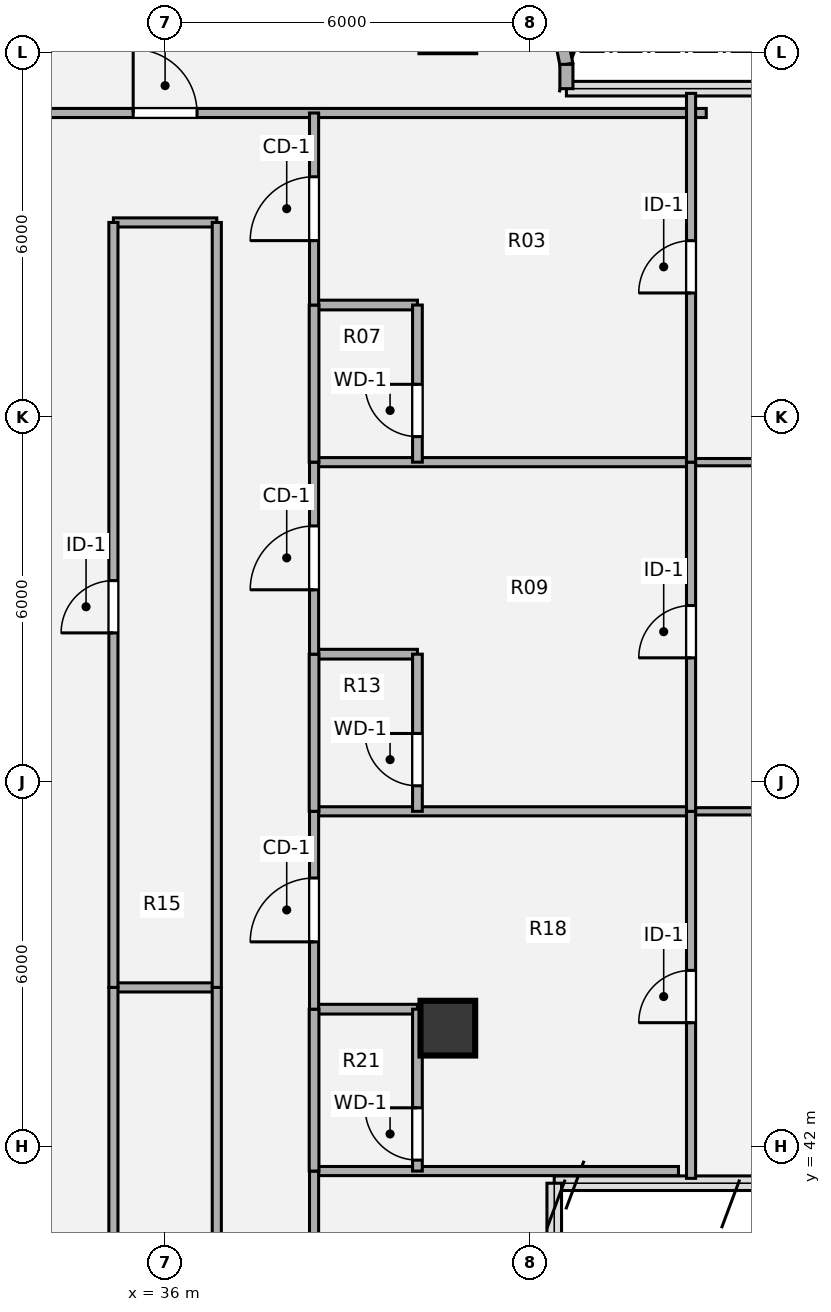
"""IFC4 building model, lengths in metres.
Left out: names, types, materials, properties, quantities, classifications, styles, units other than length and angle.
Written with IfcOpenShell. Run it as: python <this file> out.ifc"""

import sys

from ifc_helpers import new_model, si_unit, direction, frame, frame_2d, origin, origin_2d, place, context, subcontext, project, spatial, rectangle, hollow_circle, extrude, source, transform, mapped, element, fill, save


model = new_model("IFC4")
c1 = context("Model", 3, precision=1e-05, world=origin(), true_north=direction((0.0, 1.0)))
c2 = subcontext(c1, "Body", "Model", "MODEL_VIEW")
j1 = project(units=[si_unit("LENGTHUNIT", "METRE"), si_unit("PLANEANGLEUNIT", "RADIAN")], contexts=[c1])
p1 = place(None, origin())
s1 = spatial("IfcSite", under=j1, at=p1, CompositionType="ELEMENT")
p2 = place(p1, origin())
s2 = spatial("IfcBuilding", under=s1, at=p2, CompositionType="ELEMENT")
p3 = place(p2, frame((0.0, 0.0, 234.36)))
s3 = spatial("IfcBuildingStorey", under=s2, at=p3, CompositionType="ELEMENT", Elevation=234.36)
m1 = source(origin(), c2, "Body", "SweptSolid", [
    extrude(hollow_circle(Radius=0.45, WallThickness=0.032, at=origin_2d()), origin(), (0.0, 0.0, 1.0), 3.78),
])
p4 = place(p3, frame((40.65, 43.95, 0.0), z_axis=(0.0, 0.0, 1.0), x_axis=(1.0, 0.0, 0.0)))
e1 = element("IfcColumn", 1, at=p4, inside=s3, PredefinedType="COLUMN", context=c2, shape_type="MappedRepresentation", body=[
    mapped(m1, transform((0.0, 0.0, 0.0), x_axis=(1.0, 0.0, 0.0), y_axis=(0.0, 1.0, 0.0), z_axis=(0.0, 0.0, 1.0), scale=1.0)),
])
p5 = place(p3, frame((42.402, 60.795, 0.0), z_axis=(0.0, 0.0, 1.0), x_axis=(0.195190360752, -0.980765376158, 0.0)))
e2 = element("IfcWall", 2, at=p5, inside=s3, PredefinedType="SOLIDWALL", context=c2, shape_type="SweptSolid", body=[
    extrude(rectangle(XDim=1.014, YDim=0.215, at=frame_2d((0.507, 0.0))), origin(), (0.0, 0.0, 1.0), 3.53),
])
p6 = place(p3, frame((42.6, 59.8, 0.0), z_axis=(0.0, 0.0, 1.0), x_axis=(0.0, -1.0, 0.0)))
e3 = element("IfcWall", 3, at=p6, inside=s3, PredefinedType="SOLIDWALL", context=c2, shape_type="SweptSolid", body=[
    extrude(rectangle(XDim=0.4, YDim=0.215, at=frame_2d((0.2, 0.0))), origin(), (0.0, 0.0, 1.0), 3.53),
])
p7 = place(p3, frame((38.45, 41.6, 0.0), z_axis=(0.0, 0.0, 1.0), x_axis=(1.0, 0.0, 0.0)))
e4 = element("IfcWall", 4, at=p7, inside=s3, PredefinedType="PARTITIONING", context=c2, shape_type="SweptSolid", body=[
    extrude(rectangle(XDim=5.993, YDim=0.15, at=frame_2d((2.997, 0.0))), origin(), (0.0, 0.0, 1.0), 3.5),
])
p8 = place(p3, frame((38.45, 44.262, 0.0), z_axis=(0.0, 0.0, 1.0), x_axis=(1.0, 0.0, 0.0)))
e5 = element("IfcWall", 5, at=p8, inside=s3, PredefinedType="PLUMBINGWALL", context=c2, shape_type="SweptSolid", body=[
    extrude(rectangle(XDim=1.7, YDim=0.16, at=frame_2d((0.85, 0.0))), origin(), (0.0, 0.0, 1.0), 2.903),
])
p9 = place(p3, frame((35.15, 44.62, 0.0), z_axis=(0.0, 0.0, 1.0), x_axis=(1.0, 0.0, 0.0)))
e6 = element("IfcWall", 6, at=p9, inside=s3, PredefinedType="PARTITIONING", context=c2, shape_type="SweptSolid", body=[
    extrude(rectangle(XDim=1.7, YDim=0.15, at=frame_2d((0.85, 0.0))), origin(), (0.0, 0.0, 1.0), 3.259),
])
p10 = place(p3, frame((38.45, 47.516, 0.0), z_axis=(0.0, 0.0, 1.0), x_axis=(1.0, 0.0, 0.0)))
e7 = element("IfcWall", 7, at=p10, inside=s3, PredefinedType="PARTITIONING", context=c2, shape_type="SweptSolid", body=[
    extrude(rectangle(XDim=6.2, YDim=0.15, at=frame_2d((3.1, 0.0))), origin(), (0.0, 0.0, 1.0), 2.982),
])
p11 = place(p3, frame((44.65, 47.516, 0.0), z_axis=(0.0, 0.0, 1.0), x_axis=(1.0, 0.0, 0.0)))
e8 = element("IfcWall", 8, at=p11, inside=s3, PredefinedType="PARTITIONING", context=c2, shape_type="SweptSolid", body=[
    extrude(rectangle(XDim=9.57, YDim=0.12, at=frame_2d((4.785, 0.0))), origin(), (0.0, 0.0, 1.0), 2.982),
])
p12 = place(p3, frame((38.45, 50.1, 0.0), z_axis=(0.0, 0.0, 1.0), x_axis=(1.0, 0.0, 0.0)))
e9 = element("IfcWall", 9, at=p12, inside=s3, PredefinedType="PLUMBINGWALL", context=c2, shape_type="SweptSolid", body=[
    extrude(rectangle(XDim=1.7, YDim=0.16, at=frame_2d((0.85, 0.0))), origin(), (0.0, 0.0, 1.0), 3.259),
])
p13 = place(p3, frame((38.45, 53.258, 0.0), z_axis=(0.0, 0.0, 1.0), x_axis=(1.0, 0.0, 0.0)))
e10 = element("IfcWall", 10, at=p13, inside=s3, PredefinedType="PARTITIONING", context=c2, shape_type="SweptSolid", body=[
    extrude(rectangle(XDim=6.2, YDim=0.15, at=frame_2d((3.1, 0.0))), origin(), (0.0, 0.0, 1.0), 3.055),
])
p14 = place(p3, frame((44.65, 53.258, 0.0), z_axis=(0.0, 0.0, 1.0), x_axis=(1.0, 0.0, 0.0)))
e11 = element("IfcWall", 11, at=p14, inside=s3, PredefinedType="PARTITIONING", context=c2, shape_type="SweptSolid", body=[
    extrude(rectangle(XDim=9.57, YDim=0.12, at=frame_2d((4.785, 0.0))), origin(), (0.0, 0.0, 1.0), 3.055),
])
p15 = place(p3, frame((38.45, 55.842, 0.0), z_axis=(0.0, 0.0, 1.0), x_axis=(1.0, 0.0, 0.0)))
e12 = element("IfcWall", 12, at=p15, inside=s3, PredefinedType="PLUMBINGWALL", context=c2, shape_type="SweptSolid", body=[
    extrude(rectangle(XDim=1.7, YDim=0.16, at=frame_2d((0.85, 0.0))), origin(), (0.0, 0.0, 1.0), 3.259),
])
p16 = place(p3, frame((35.15, 57.2, 0.0), z_axis=(0.0, 0.0, 1.0), x_axis=(1.0, 0.0, 0.0)))
e13 = element("IfcWall", 13, at=p16, inside=s3, PredefinedType="PARTITIONING", context=c2, shape_type="SweptSolid", body=[
    extrude(rectangle(XDim=1.7, YDim=0.15, at=frame_2d((0.85, 0.0))), origin(), (0.0, 0.0, 1.0), 3.308),
])
p17 = place(p3, frame((27.1, 59.0, 0.0), z_axis=(0.0, 0.0, 1.0), x_axis=(1.0, 0.0, 0.0)))
e14 = element("IfcWall", 14, at=p17, inside=s3, PredefinedType="PARTITIONING", context=c2, shape_type="SweptSolid", body=[
    extrude(rectangle(XDim=17.8, YDim=0.15, at=frame_2d((8.9, 0.0))), origin(), (0.0, 0.0, 1.0), 3.308),
])
p18 = place(p17, frame((8.375, 0.0, 0.0)))
e15 = element("IfcOpeningElement", 15, at=p18, cuts=e14, PredefinedType="OPENING", context=c2, shape_type="SweptSolid", body=[
    extrude(rectangle(XDim=1.05, YDim=2.1, at=origin_2d()), frame((0.525, 0.085, 1.05), z_axis=(0.0, -1.0, 0.0), x_axis=(1.0, 0.0, 0.0)), (0.0, 0.0, 1.0), 0.17),
])
p19 = place(p3, frame((35.15, 25.2, 0.0), z_axis=(0.0, 0.0, 1.0), x_axis=(0.0, 1.0, 0.0)))
e16 = element("IfcWall", 16, at=p19, inside=s3, PredefinedType="PARTITIONING", context=c2, shape_type="SweptSolid", body=[
    extrude(rectangle(XDim=19.42, YDim=0.15, at=frame_2d((9.71, 0.0))), origin(), (0.0, 0.0, 1.0), 3.5),
])
p20 = place(p3, frame((35.15, 44.62, 0.0), z_axis=(0.0, 0.0, 1.0), x_axis=(0.0, 1.0, 0.0)))
e17 = element("IfcWall", 17, at=p20, inside=s3, PredefinedType="PARTITIONING", context=c2, shape_type="SweptSolid", body=[
    extrude(rectangle(XDim=12.58, YDim=0.15, at=frame_2d((6.29, 0.0))), origin(), (0.0, 0.0, 1.0), 3.5),
])
p21 = place(p20, frame((5.83, 0.0, 0.0)))
e18 = element("IfcOpeningElement", 18, at=p21, cuts=e17, PredefinedType="OPENING", context=c2, shape_type="SweptSolid", body=[
    extrude(rectangle(XDim=0.86, YDim=2.1, at=origin_2d()), frame((0.43, 0.085, 1.05), z_axis=(0.0, -1.0, 0.0), x_axis=(1.0, 0.0, 0.0)), (0.0, 0.0, 1.0), 0.17),
])
p22 = place(p3, frame((36.85, 25.2, 0.0), z_axis=(0.0, 0.0, 1.0), x_axis=(0.0, 1.0, 0.0)))
e19 = element("IfcWall", 19, at=p22, inside=s3, PredefinedType="PARTITIONING", context=c2, shape_type="SweptSolid", body=[
    extrude(rectangle(XDim=19.42, YDim=0.15, at=frame_2d((9.71, 0.0))), origin(), (0.0, 0.0, 1.0), 3.5),
])
p23 = place(p22, frame((9.185, 0.0, 0.0)))
e20 = element("IfcOpeningElement", 20, at=p23, cuts=e19, PredefinedType="OPENING", context=c2, shape_type="SweptSolid", body=[
    extrude(rectangle(XDim=1.05, YDim=2.1, at=origin_2d()), frame((0.525, 0.085, 1.05), z_axis=(0.0, -1.0, 0.0), x_axis=(1.0, 0.0, 0.0)), (0.0, 0.0, 1.0), 0.17),
])
p24 = place(p3, frame((36.85, 44.62, 0.0), z_axis=(0.0, 0.0, 1.0), x_axis=(0.0, 1.0, 0.0)))
e21 = element("IfcWall", 21, at=p24, inside=s3, PredefinedType="PARTITIONING", context=c2, shape_type="SweptSolid", body=[
    extrude(rectangle(XDim=12.58, YDim=0.15, at=frame_2d((6.29, 0.0))), origin(), (0.0, 0.0, 1.0), 3.5),
])
p25 = place(p3, frame((38.45, 21.2, 0.0), z_axis=(0.0, 0.0, 1.0), x_axis=(0.0, 1.0, 0.0)))
e22 = element("IfcWall", 22, at=p25, inside=s3, PredefinedType="PARTITIONING", context=c2, shape_type="SweptSolid", body=[
    extrude(rectangle(XDim=20.4, YDim=0.15, at=frame_2d((10.2, 0.0))), origin(), (0.0, 0.0, 1.0), 3.5),
])
p26 = place(p25, frame((9.575, 0.0, 0.0)))
e23 = element("IfcOpeningElement", 23, at=p26, cuts=e22, PredefinedType="OPENING", context=c2, shape_type="SweptSolid", body=[
    extrude(rectangle(XDim=1.05, YDim=2.1, at=origin_2d()), frame((0.525, 0.085, 1.05), z_axis=(0.0, -1.0, 0.0), x_axis=(1.0, 0.0, 0.0)), (0.0, 0.0, 1.0), 0.17),
])
p27 = place(p3, frame((38.45, 41.6, 0.0), z_axis=(0.0, 0.0, 1.0), x_axis=(0.0, 1.0, 0.0)))
e24 = element("IfcWall", 24, at=p27, inside=s3, PredefinedType="PLUMBINGWALL", context=c2, shape_type="SweptSolid", body=[
    extrude(rectangle(XDim=2.662, YDim=0.16, at=frame_2d((1.331, 0.0))), origin(), (0.0, 0.0, 1.0), 3.5),
])
p28 = place(p3, frame((38.45, 44.262, 0.0), z_axis=(0.0, 0.0, 1.0), x_axis=(0.0, 1.0, 0.0)))
e25 = element("IfcWall", 25, at=p28, inside=s3, PredefinedType="PARTITIONING", context=c2, shape_type="SweptSolid", body=[
    extrude(rectangle(XDim=3.254, YDim=0.15, at=frame_2d((1.627, 0.0))), origin(), (0.0, 0.0, 1.0), 3.5),
])
p29 = place(p28, frame((1.107, 0.0, 0.0)))
e26 = element("IfcOpeningElement", 26, at=p29, cuts=e25, PredefinedType="OPENING", context=c2, shape_type="SweptSolid", body=[
    extrude(rectangle(XDim=1.05, YDim=2.1, at=origin_2d()), frame((0.525, 0.085, 1.05), z_axis=(0.0, -1.0, 0.0), x_axis=(1.0, 0.0, 0.0)), (0.0, 0.0, 1.0), 0.17),
])
p30 = place(p3, frame((38.45, 47.516, 0.0), z_axis=(0.0, 0.0, 1.0), x_axis=(0.0, 1.0, 0.0)))
e27 = element("IfcWall", 27, at=p30, inside=s3, PredefinedType="PLUMBINGWALL", context=c2, shape_type="SweptSolid", body=[
    extrude(rectangle(XDim=2.584, YDim=0.16, at=frame_2d((1.292, 0.0))), origin(), (0.0, 0.0, 1.0), 3.5),
])
p31 = place(p3, frame((38.45, 50.1, 0.0), z_axis=(0.0, 0.0, 1.0), x_axis=(0.0, 1.0, 0.0)))
e28 = element("IfcWall", 28, at=p31, inside=s3, PredefinedType="PARTITIONING", context=c2, shape_type="SweptSolid", body=[
    extrude(rectangle(XDim=3.158, YDim=0.15, at=frame_2d((1.579, 0.0))), origin(), (0.0, 0.0, 1.0), 3.5),
])
p32 = place(p31, frame((1.059, 0.0, 0.0)))
e29 = element("IfcOpeningElement", 29, at=p32, cuts=e28, PredefinedType="OPENING", context=c2, shape_type="SweptSolid", body=[
    extrude(rectangle(XDim=1.05, YDim=2.1, at=origin_2d()), frame((0.525, 0.085, 1.05), z_axis=(0.0, -1.0, 0.0), x_axis=(1.0, 0.0, 0.0)), (0.0, 0.0, 1.0), 0.17),
])
p33 = place(p3, frame((38.45, 53.258, 0.0), z_axis=(0.0, 0.0, 1.0), x_axis=(0.0, 1.0, 0.0)))
e30 = element("IfcWall", 30, at=p33, inside=s3, PredefinedType="PLUMBINGWALL", context=c2, shape_type="SweptSolid", body=[
    extrude(rectangle(XDim=2.584, YDim=0.16, at=frame_2d((1.292, 0.0))), origin(), (0.0, 0.0, 1.0), 3.5),
])
p34 = place(p3, frame((38.45, 55.842, 0.0), z_axis=(0.0, 0.0, 1.0), x_axis=(0.0, 1.0, 0.0)))
e31 = element("IfcWall", 31, at=p34, inside=s3, PredefinedType="PARTITIONING", context=c2, shape_type="SweptSolid", body=[
    extrude(rectangle(XDim=3.158, YDim=0.15, at=frame_2d((1.579, 0.0))), origin(), (0.0, 0.0, 1.0), 3.5),
])
p35 = place(p34, frame((1.059, 0.0, 0.0)))
e32 = element("IfcOpeningElement", 32, at=p35, cuts=e31, PredefinedType="OPENING", context=c2, shape_type="SweptSolid", body=[
    extrude(rectangle(XDim=1.05, YDim=2.1, at=origin_2d()), frame((0.525, 0.085, 1.05), z_axis=(0.0, -1.0, 0.0), x_axis=(1.0, 0.0, 0.0)), (0.0, 0.0, 1.0), 0.17),
])
p36 = place(p3, frame((40.15, 41.6, 0.0), z_axis=(0.0, 0.0, 1.0), x_axis=(0.0, 1.0, 0.0)))
e33 = element("IfcWall", 33, at=p36, inside=s3, PredefinedType="PLUMBINGWALL", context=c2, shape_type="SweptSolid", body=[
    extrude(rectangle(XDim=2.662, YDim=0.16, at=frame_2d((1.331, 0.0))), origin(), (0.0, 0.0, 1.0), 3.5),
])
p37 = place(p36, frame((0.18, 0.0, 0.0)))
e34 = element("IfcOpeningElement", 34, at=p37, cuts=e33, PredefinedType="OPENING", context=c2, shape_type="SweptSolid", body=[
    extrude(rectangle(XDim=0.86, YDim=2.1, at=origin_2d()), frame((0.43, 0.09, 1.05), z_axis=(0.0, -1.0, 0.0), x_axis=(1.0, 0.0, 0.0)), (0.0, 0.0, 1.0), 0.18),
])
p38 = place(p3, frame((40.15, 47.516, 0.0), z_axis=(0.0, 0.0, 1.0), x_axis=(0.0, 1.0, 0.0)))
e35 = element("IfcWall", 35, at=p38, inside=s3, PredefinedType="PLUMBINGWALL", context=c2, shape_type="SweptSolid", body=[
    extrude(rectangle(XDim=2.584, YDim=0.16, at=frame_2d((1.292, 0.0))), origin(), (0.0, 0.0, 1.0), 3.5),
])
p39 = place(p38, frame((0.42, 0.0, 0.0)))
e36 = element("IfcOpeningElement", 36, at=p39, cuts=e35, PredefinedType="OPENING", context=c2, shape_type="SweptSolid", body=[
    extrude(rectangle(XDim=0.86, YDim=2.1, at=origin_2d()), frame((0.43, 0.09, 1.05), z_axis=(0.0, -1.0, 0.0), x_axis=(1.0, 0.0, 0.0)), (0.0, 0.0, 1.0), 0.18),
])
p40 = place(p3, frame((40.15, 53.258, 0.0), z_axis=(0.0, 0.0, 1.0), x_axis=(0.0, 1.0, 0.0)))
e37 = element("IfcWall", 37, at=p40, inside=s3, PredefinedType="PLUMBINGWALL", context=c2, shape_type="SweptSolid", body=[
    extrude(rectangle(XDim=2.584, YDim=0.16, at=frame_2d((1.292, 0.0))), origin(), (0.0, 0.0, 1.0), 3.5),
])
p41 = place(p40, frame((0.42, 0.0, 0.0)))
e38 = element("IfcOpeningElement", 38, at=p41, cuts=e37, PredefinedType="OPENING", context=c2, shape_type="SweptSolid", body=[
    extrude(rectangle(XDim=0.86, YDim=2.1, at=origin_2d()), frame((0.43, 0.09, 1.05), z_axis=(0.0, -1.0, 0.0), x_axis=(1.0, 0.0, 0.0)), (0.0, 0.0, 1.0), 0.18),
])
p42 = place(p3, frame((44.65, 41.48, 0.0), z_axis=(0.0, 0.0, 1.0), x_axis=(0.0, 1.0, 0.0)))
e39 = element("IfcWall", 39, at=p42, inside=s3, PredefinedType="PARTITIONING", context=c2, shape_type="SweptSolid", body=[
    extrude(rectangle(XDim=6.036, YDim=0.15, at=frame_2d((3.018, 0.0))), origin(), (0.0, 0.0, 1.0), 3.5),
])
p43 = place(p42, frame((2.56, 0.0, 0.0)))
e40 = element("IfcOpeningElement", 40, at=p43, cuts=e39, PredefinedType="OPENING", context=c2, shape_type="SweptSolid", body=[
    extrude(rectangle(XDim=0.86, YDim=2.1, at=origin_2d()), frame((0.43, 0.085, 1.05), z_axis=(0.0, -1.0, 0.0), x_axis=(1.0, 0.0, 0.0)), (0.0, 0.0, 1.0), 0.17),
])
p44 = place(p3, frame((44.65, 47.516, 0.0), z_axis=(0.0, 0.0, 1.0), x_axis=(0.0, 1.0, 0.0)))
e41 = element("IfcWall", 41, at=p44, inside=s3, PredefinedType="PARTITIONING", context=c2, shape_type="SweptSolid", body=[
    extrude(rectangle(XDim=5.742, YDim=0.15, at=frame_2d((2.871, 0.0))), origin(), (0.0, 0.0, 1.0), 3.5),
])
p45 = place(p44, frame((2.524, 0.0, 0.0)))
e42 = element("IfcOpeningElement", 42, at=p45, cuts=e41, PredefinedType="OPENING", context=c2, shape_type="SweptSolid", body=[
    extrude(rectangle(XDim=0.86, YDim=2.1, at=origin_2d()), frame((0.43, 0.085, 1.05), z_axis=(0.0, -1.0, 0.0), x_axis=(1.0, 0.0, 0.0)), (0.0, 0.0, 1.0), 0.17),
])
p46 = place(p3, frame((44.65, 53.258, 0.0), z_axis=(0.0, 0.0, 1.0), x_axis=(0.0, 1.0, 0.0)))
e43 = element("IfcWall", 43, at=p46, inside=s3, PredefinedType="PARTITIONING", context=c2, shape_type="SweptSolid", body=[
    extrude(rectangle(XDim=6.064, YDim=0.15, at=frame_2d((3.032, 0.0))), origin(), (0.0, 0.0, 1.0), 3.5),
])
p47 = place(p46, frame((2.782, 0.0, 0.0)))
e44 = element("IfcOpeningElement", 44, at=p47, cuts=e43, PredefinedType="OPENING", context=c2, shape_type="SweptSolid", body=[
    extrude(rectangle(XDim=0.86, YDim=2.1, at=origin_2d()), frame((0.43, 0.085, 1.05), z_axis=(0.0, -1.0, 0.0), x_axis=(1.0, 0.0, 0.0)), (0.0, 0.0, 1.0), 0.17),
])
m2 = source(origin(), c2, "Body", "SweptSolid", [
    extrude(rectangle(XDim=1.05, YDim=2.1, at=origin_2d()), frame((0.525, 0.025, 1.05), z_axis=(0.0, -1.0, 0.0), x_axis=(1.0, 0.0, 0.0)), (0.0, 0.0, 1.0), 0.05),
])
p48 = place(p18, origin())
e45 = element("IfcDoor", 45, at=p48, inside=s3, OperationType="SINGLE_SWING_LEFT", PredefinedType="DOOR", context=c2, shape_type="MappedRepresentation", body=[
    mapped(m2, transform((0.0, 0.0, 0.0), x_axis=(1.0, 0.0, 0.0), y_axis=(0.0, 1.0, 0.0), z_axis=(0.0, 0.0, 1.0), scale=1.0)),
])
fill(e15, e45)
m3 = source(origin(), c2, "Body", "SweptSolid", [
    extrude(rectangle(XDim=0.86, YDim=2.1, at=origin_2d()), frame((0.43, 0.025, 1.05), z_axis=(0.0, -1.0, 0.0), x_axis=(1.0, 0.0, 0.0)), (0.0, 0.0, 1.0), 0.05),
])
p49 = place(p21, origin())
e46 = element("IfcDoor", 46, at=p49, inside=s3, OperationType="SINGLE_SWING_LEFT", PredefinedType="DOOR", context=c2, shape_type="MappedRepresentation", body=[
    mapped(m3, transform((0.0, 0.0, 0.0), x_axis=(1.0, 0.0, 0.0), y_axis=(0.0, 1.0, 0.0), z_axis=(0.0, 0.0, 1.0), scale=1.0)),
])
fill(e18, e46)
m4 = source(origin(), c2, "Body", "SweptSolid", [
    extrude(rectangle(XDim=1.05, YDim=2.1, at=origin_2d()), frame((0.525, 0.025, 1.05), z_axis=(0.0, -1.0, 0.0), x_axis=(1.0, 0.0, 0.0)), (0.0, 0.0, 1.0), 0.05),
])
p50 = place(p29, origin())
e47 = element("IfcDoor", 47, at=p50, inside=s3, OperationType="SINGLE_SWING_LEFT", PredefinedType="DOOR", context=c2, shape_type="MappedRepresentation", body=[
    mapped(m4, transform((0.0, 0.0, 0.0), x_axis=(1.0, 0.0, 0.0), y_axis=(0.0, 1.0, 0.0), z_axis=(0.0, 0.0, 1.0), scale=1.0)),
])
fill(e26, e47)
p51 = place(p32, origin())
e48 = element("IfcDoor", 48, at=p51, inside=s3, OperationType="SINGLE_SWING_LEFT", PredefinedType="DOOR", context=c2, shape_type="MappedRepresentation", body=[
    mapped(m4, transform((0.0, 0.0, 0.0), x_axis=(1.0, 0.0, 0.0), y_axis=(0.0, 1.0, 0.0), z_axis=(0.0, 0.0, 1.0), scale=1.0)),
])
fill(e29, e48)
p52 = place(p35, origin())
e49 = element("IfcDoor", 49, at=p52, inside=s3, OperationType="SINGLE_SWING_LEFT", PredefinedType="DOOR", context=c2, shape_type="MappedRepresentation", body=[
    mapped(m4, transform((0.0, 0.0, 0.0), x_axis=(1.0, 0.0, 0.0), y_axis=(0.0, 1.0, 0.0), z_axis=(0.0, 0.0, 1.0), scale=1.0)),
])
fill(e32, e49)
m5 = source(origin(), c2, "Body", "SweptSolid", [
    extrude(rectangle(XDim=0.86, YDim=2.1, at=origin_2d()), frame((0.43, 0.025, 1.05), z_axis=(0.0, -1.0, 0.0), x_axis=(1.0, 0.0, 0.0)), (0.0, 0.0, 1.0), 0.05),
])
p53 = place(p37, origin())
e50 = element("IfcDoor", 50, at=p53, inside=s3, OperationType="SINGLE_SWING_RIGHT", PredefinedType="DOOR", context=c2, shape_type="MappedRepresentation", body=[
    mapped(m5, transform((0.0, 0.0, 0.0), x_axis=(1.0, 0.0, 0.0), y_axis=(0.0, 1.0, 0.0), z_axis=(0.0, 0.0, 1.0), scale=1.0)),
])
fill(e34, e50)
p54 = place(p39, origin())
e51 = element("IfcDoor", 51, at=p54, inside=s3, OperationType="SINGLE_SWING_RIGHT", PredefinedType="DOOR", context=c2, shape_type="MappedRepresentation", body=[
    mapped(m5, transform((0.0, 0.0, 0.0), x_axis=(1.0, 0.0, 0.0), y_axis=(0.0, 1.0, 0.0), z_axis=(0.0, 0.0, 1.0), scale=1.0)),
])
fill(e36, e51)
p55 = place(p41, origin())
e52 = element("IfcDoor", 52, at=p55, inside=s3, OperationType="SINGLE_SWING_RIGHT", PredefinedType="DOOR", context=c2, shape_type="MappedRepresentation", body=[
    mapped(m5, transform((0.0, 0.0, 0.0), x_axis=(1.0, 0.0, 0.0), y_axis=(0.0, 1.0, 0.0), z_axis=(0.0, 0.0, 1.0), scale=1.0)),
])
fill(e38, e52)
p56 = place(p43, origin())
e53 = element("IfcDoor", 53, at=p56, inside=s3, OperationType="SINGLE_SWING_LEFT", PredefinedType="DOOR", context=c2, shape_type="MappedRepresentation", body=[
    mapped(m3, transform((0.0, 0.0, 0.0), x_axis=(1.0, 0.0, 0.0), y_axis=(0.0, 1.0, 0.0), z_axis=(0.0, 0.0, 1.0), scale=1.0)),
])
fill(e40, e53)
p57 = place(p45, origin())
e54 = element("IfcDoor", 54, at=p57, inside=s3, OperationType="SINGLE_SWING_LEFT", PredefinedType="DOOR", context=c2, shape_type="MappedRepresentation", body=[
    mapped(m3, transform((0.0, 0.0, 0.0), x_axis=(1.0, 0.0, 0.0), y_axis=(0.0, 1.0, 0.0), z_axis=(0.0, 0.0, 1.0), scale=1.0)),
])
fill(e42, e54)
p58 = place(p47, origin())
e55 = element("IfcDoor", 55, at=p58, inside=s3, OperationType="SINGLE_SWING_LEFT", PredefinedType="DOOR", context=c2, shape_type="MappedRepresentation", body=[
    mapped(m3, transform((0.0, 0.0, 0.0), x_axis=(1.0, 0.0, 0.0), y_axis=(0.0, 1.0, 0.0), z_axis=(0.0, 0.0, 1.0), scale=1.0)),
])
fill(e44, e55)
save(model, sys.argv[1])
